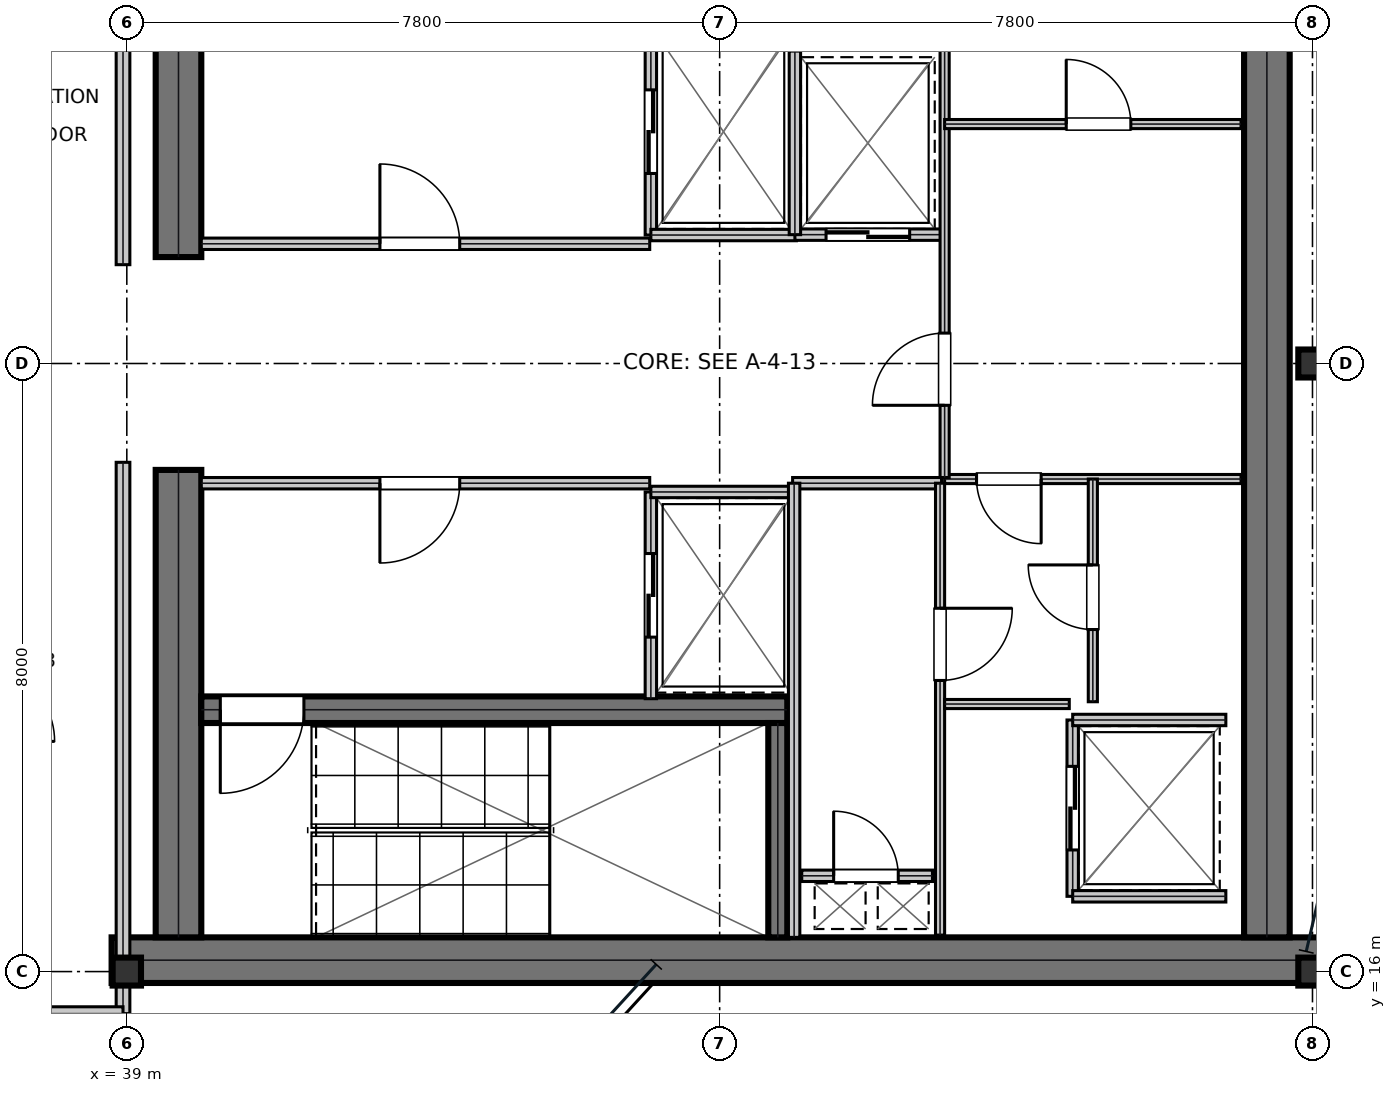
"""IFC4 building model, lengths in metres.
Left out: names, types, materials, properties, quantities, classifications, styles, units other than length and angle.
Written with IfcOpenShell. Run it as: python <this file> out.ifc"""

import sys

from ifc_helpers import new_model, si_unit, direction, frame, frame_2d, origin, origin_2d, place, context, subcontext, project, spatial, rectangle, i_section, extrude, element, fill, save


model = new_model("IFC4")
c1 = context("Model", 3, precision=1e-05, world=origin(), true_north=direction((0.0, 1.0)))
c2 = subcontext(c1, "Body", "Model", "MODEL_VIEW")
j1 = project(units=[si_unit("LENGTHUNIT", "METRE"), si_unit("PLANEANGLEUNIT", "RADIAN")], contexts=[c1])
p1 = place(None, origin())
s1 = spatial("IfcSite", under=j1, at=p1, CompositionType="ELEMENT")
p2 = place(p1, origin())
s2 = spatial("IfcBuilding", under=s1, at=p2, CompositionType="ELEMENT")
p3 = place(p2, frame((0.0, 0.0, 283.05)))
s3 = spatial("IfcBuildingStorey", under=s2, at=p3, CompositionType="ELEMENT", Elevation=283.05)
p4 = place(p3, frame((38.8, 16.15, 0.0), z_axis=(0.0, 0.0, 1.0), x_axis=(1.0, 0.0, 0.0)))
e1 = element("IfcWall", 1, at=p4, inside=s3, PredefinedType="SHEAR", context=c2, shape_type="SweptSolid", body=[
    extrude(rectangle(XDim=16.0, YDim=0.6, at=frame_2d((8.0, 0.0))), origin(), (0.0, 0.0, 1.0), 3.81),
])
for number, where, z_axis, x_axis in (
    (2, (39.68, 16.45, 0.0), (0.0, 0.0, 1.0), (0.0, 1.0, 0.0)),
    (3, (39.68, 25.4, 0.0), (0.0, 0.0, 1.0), (0.0, 1.0, 0.0)),
):
    element("IfcWall", number, at=place(p3, frame(where, z_axis=z_axis, x_axis=x_axis)), inside=s3, PredefinedType="SHEAR", context=c2, shape_type="SweptSolid", body=[
        extrude(rectangle(XDim=6.15, YDim=0.6, at=frame_2d((3.075, 0.0))), origin(), (0.0, 0.0, 1.0), 3.81),
    ])
p5 = place(p3, frame((54.0, 16.45, 0.0), z_axis=(0.0, 0.0, 1.0), x_axis=(0.0, 1.0, 0.0)))
e4 = element("IfcWall", 4, at=p5, inside=s3, PredefinedType="SHEAR", context=c2, shape_type="SweptSolid", body=[
    extrude(rectangle(XDim=15.1, YDim=0.6, at=frame_2d((7.55, 0.0))), origin(), (0.0, 0.0, 1.0), 3.81),
])
p6 = place(p3, frame((39.98, 19.445, 0.0), z_axis=(0.0, 0.0, 1.0), x_axis=(1.0, 0.0, 0.0)))
e5 = element("IfcWall", 5, at=p6, inside=s3, PredefinedType="SHEAR", context=c2, shape_type="SweptSolid", body=[
    extrude(rectangle(XDim=7.71, YDim=0.35, at=frame_2d((3.855, 0.0))), origin(), (0.0, 0.0, 1.0), 3.81),
])
p7 = place(p6, frame((0.25, 0.0, 0.0)))
e6 = element("IfcOpeningElement", 6, at=p7, cuts=e5, PredefinedType="OPENING", context=c2, shape_type="SweptSolid", body=[
    extrude(rectangle(XDim=1.1, YDim=2.15, at=frame_2d((0.55, 1.075))), frame((0.0, 0.185, 0.0), z_axis=(0.0, -1.0, 0.0), x_axis=(1.0, 0.0, 0.0)), (0.0, 0.0, 1.0), 0.37),
])
p8 = place(p3, frame((47.565, 16.45, 0.0), z_axis=(0.0, 0.0, 1.0), x_axis=(0.0, 1.0, 0.0)))
e7 = element("IfcWall", 7, at=p8, inside=s3, PredefinedType="SHEAR", context=c2, shape_type="SweptSolid", body=[
    extrude(rectangle(XDim=2.82, YDim=0.25, at=frame_2d((1.41, 0.0))), origin(), (0.0, 0.0, 1.0), 3.81),
])
for number, where, z_axis, x_axis in (
    (8, (39.0, 16.0, 0.0), (0.0, 0.0, 1.0), (1.0, 0.0, 0.0)),
    (9, (54.6, 16.0, 0.0), (0.0, 0.0, 1.0), (1.0, 0.0, 0.0)),
    (10, (54.6, 24.0, 0.0), (0.0, 0.0, 1.0), (1.0, 0.0, 0.0)),
):
    element("IfcColumn", number, at=place(p3, frame(where, z_axis=z_axis, x_axis=x_axis)), inside=s3, PredefinedType="COLUMN", context=c2, shape_type="SweptSolid", body=[
        extrude(i_section(OverallWidth=0.373, OverallDepth=0.368, WebThickness=0.015, FlangeThickness=0.024, at=origin_2d()), origin(), (0.0, 0.0, 1.0), 4.044),
    ])
p9 = place(p3, frame((39.98, 25.575, 0.0), z_axis=(0.0, 0.0, 1.0), x_axis=(1.0, 0.0, 0.0)))
e11 = element("IfcWall", 11, at=p9, inside=s3, PredefinedType="PARTITIONING", context=c2, shape_type="SweptSolid", body=[
    extrude(rectangle(XDim=5.9, YDim=0.15, at=frame_2d((2.95, 0.0))), origin(), (0.0, 0.0, 1.0), 3.81),
])
p10 = place(p9, frame((2.35, 0.0, 0.0)))
e12 = element("IfcOpeningElement", 12, at=p10, cuts=e11, PredefinedType="OPENING", context=c2, shape_type="SweptSolid", body=[
    extrude(rectangle(XDim=1.05, YDim=2.15, at=frame_2d((0.525, 1.075))), frame((0.0, 0.085, 0.0), z_axis=(0.0, -1.0, 0.0), x_axis=(1.0, 0.0, 0.0)), (0.0, 0.0, 1.0), 0.17),
])
p11 = place(p3, frame((39.98, 22.425, 0.0), z_axis=(0.0, 0.0, 1.0), x_axis=(1.0, 0.0, 0.0)))
e13 = element("IfcWall", 13, at=p11, inside=s3, PredefinedType="PARTITIONING", context=c2, shape_type="SweptSolid", body=[
    extrude(rectangle(XDim=5.9, YDim=0.15, at=frame_2d((2.95, 0.0))), origin(), (0.0, 0.0, 1.0), 3.81),
])
p12 = place(p11, frame((2.35, 0.0, 0.0)))
e14 = element("IfcOpeningElement", 14, at=p12, cuts=e13, PredefinedType="OPENING", context=c2, shape_type="SweptSolid", body=[
    extrude(rectangle(XDim=1.05, YDim=2.15, at=frame_2d((0.525, 1.075))), frame((0.0, 0.085, 0.0), z_axis=(0.0, -1.0, 0.0), x_axis=(1.0, 0.0, 0.0)), (0.0, 0.0, 1.0), 0.17),
])
p13 = place(p3, frame((45.895, 25.69, 0.0), z_axis=(0.0, 0.0, 1.0), x_axis=(0.0, 1.0, 0.0)))
e15 = element("IfcWall", 15, at=p13, inside=s3, PredefinedType="PARTITIONING", context=c2, shape_type="SweptSolid", body=[
    extrude(rectangle(XDim=2.72, YDim=0.15, at=frame_2d((1.36, 0.0))), origin(), (0.0, 0.0, 1.0), 3.81),
])
p14 = place(p13, frame((0.81, 0.0, 0.0)))
e16 = element("IfcOpeningElement", 16, at=p14, cuts=e15, PredefinedType="OPENING", context=c2, shape_type="SweptSolid", body=[
    extrude(rectangle(XDim=1.1, YDim=2.15, at=frame_2d((0.55, 1.075))), frame((0.0, 0.085, 0.0), z_axis=(0.0, -1.0, 0.0), x_axis=(1.0, 0.0, 0.0)), (0.0, 0.0, 1.0), 0.17),
])
p15 = place(p3, frame((45.895, 25.69, 0.0), z_axis=(0.0, 0.0, 1.0), x_axis=(1.0, 0.0, 0.0)))
e17 = element("IfcWall", 17, at=p15, inside=s3, PredefinedType="PARTITIONING", context=c2, shape_type="SweptSolid", body=[
    extrude(rectangle(XDim=1.915, YDim=0.15, at=frame_2d((0.958, 0.0))), origin(), (0.0, 0.0, 1.0), 3.81),
])
p16 = place(p3, frame((45.895, 19.59, 0.0), z_axis=(0.0, 0.0, 1.0), x_axis=(0.0, 1.0, 0.0)))
e18 = element("IfcWall", 18, at=p16, inside=s3, PredefinedType="PARTITIONING", context=c2, shape_type="SweptSolid", body=[
    extrude(rectangle(XDim=2.72, YDim=0.15, at=frame_2d((1.36, 0.0))), origin(), (0.0, 0.0, 1.0), 3.81),
])
p17 = place(p16, frame((0.81, 0.0, 0.0)))
e19 = element("IfcOpeningElement", 19, at=p17, cuts=e18, PredefinedType="OPENING", context=c2, shape_type="SweptSolid", body=[
    extrude(rectangle(XDim=1.1, YDim=2.15, at=frame_2d((0.55, 1.075))), frame((0.0, 0.085, 0.0), z_axis=(0.0, -1.0, 0.0), x_axis=(1.0, 0.0, 0.0)), (0.0, 0.0, 1.0), 0.17),
])
p18 = place(p3, frame((45.895, 22.31, 0.0), z_axis=(0.0, 0.0, 1.0), x_axis=(1.0, 0.0, 0.0)))
e20 = element("IfcWall", 20, at=p18, inside=s3, PredefinedType="PARTITIONING", context=c2, shape_type="SweptSolid", body=[
    extrude(rectangle(XDim=1.915, YDim=0.15, at=frame_2d((0.958, 0.0))), origin(), (0.0, 0.0, 1.0), 3.81),
])
p19 = place(p3, frame((47.79, 25.695, 0.0), z_axis=(0.0, 0.0, 1.0), x_axis=(1.0, 0.0, 0.0)))
e21 = element("IfcWall", 21, at=p19, inside=s3, PredefinedType="PARTITIONING", context=c2, shape_type="SweptSolid", body=[
    extrude(rectangle(XDim=1.92, YDim=0.15, at=frame_2d((0.96, 0.0))), origin(), (0.0, 0.0, 1.0), 3.81),
])
p20 = place(p19, frame((0.41, 0.0, 0.0)))
e22 = element("IfcOpeningElement", 22, at=p20, cuts=e21, PredefinedType="OPENING", context=c2, shape_type="SweptSolid", body=[
    extrude(rectangle(XDim=1.1, YDim=2.15, at=frame_2d((0.55, 1.075))), frame((0.0, 0.085, 0.0), z_axis=(0.0, -1.0, 0.0), x_axis=(1.0, 0.0, 0.0)), (0.0, 0.0, 1.0), 0.17),
])
p21 = place(p3, frame((47.79, 25.695, 0.0), z_axis=(0.0, 0.0, 1.0), x_axis=(0.0, 1.0, 0.0)))
e23 = element("IfcWall", 23, at=p21, inside=s3, PredefinedType="PARTITIONING", context=c2, shape_type="SweptSolid", body=[
    extrude(rectangle(XDim=2.415, YDim=0.15, at=frame_2d((1.208, 0.0))), origin(), (0.0, 0.0, 1.0), 3.81),
])
p22 = place(p3, frame((51.445, 16.99, 0.0), z_axis=(0.0, 0.0, 1.0), x_axis=(0.0, 1.0, 0.0)))
e24 = element("IfcWall", 24, at=p22, inside=s3, PredefinedType="PARTITIONING", context=c2, shape_type="SweptSolid", body=[
    extrude(rectangle(XDim=2.32, YDim=0.15, at=frame_2d((1.16, 0.0))), origin(), (0.0, 0.0, 1.0), 3.81),
])
p23 = place(p22, frame((0.61, 0.0, 0.0)))
e25 = element("IfcOpeningElement", 25, at=p23, cuts=e24, PredefinedType="OPENING", context=c2, shape_type="SweptSolid", body=[
    extrude(rectangle(XDim=1.1, YDim=2.15, at=frame_2d((0.55, 1.075))), frame((0.0, 0.085, 0.0), z_axis=(0.0, -1.0, 0.0), x_axis=(1.0, 0.0, 0.0)), (0.0, 0.0, 1.0), 0.17),
])
for number, where, z_axis, x_axis in (
    (26, (51.445, 16.99, 0.0), (0.0, 0.0, 1.0), (1.0, 0.0, 0.0)),
    (27, (51.445, 19.31, 0.0), (0.0, 0.0, 1.0), (1.0, 0.0, 0.0)),
):
    element("IfcWall", number, at=place(p3, frame(where, z_axis=z_axis, x_axis=x_axis)), inside=s3, PredefinedType="PARTITIONING", context=c2, shape_type="SweptSolid", body=[
        extrude(rectangle(XDim=2.015, YDim=0.15, at=frame_2d((1.007, 0.0))), origin(), (0.0, 0.0, 1.0), 3.81),
    ])
p24 = place(p3, frame((47.88, 17.26, 0.0), z_axis=(0.0, 0.0, 1.0), x_axis=(1.0, 0.0, 0.0)))
e28 = element("IfcWall", 28, at=p24, inside=s3, PredefinedType="PARTITIONING", context=c2, shape_type="SweptSolid", body=[
    extrude(rectangle(XDim=1.72, YDim=0.15, at=frame_2d((0.86, 0.0))), origin(), (0.0, 0.0, 1.0), 3.81),
])
p25 = place(p24, frame((0.42, 0.0, 0.0)))
e29 = element("IfcOpeningElement", 29, at=p25, cuts=e28, PredefinedType="OPENING", context=c2, shape_type="SweptSolid", body=[
    extrude(rectangle(XDim=0.85, YDim=2.15, at=frame_2d((0.425, 1.075))), frame((0.0, 0.085, 0.0), z_axis=(0.0, -1.0, 0.0), x_axis=(1.0, 0.0, 0.0)), (0.0, 0.0, 1.0), 0.17),
])
p26 = place(p3, frame((47.76, 22.425, 0.0), z_axis=(0.0, 0.0, 1.0), x_axis=(1.0, 0.0, 0.0)))
e30 = element("IfcWall", 30, at=p26, inside=s3, PredefinedType="PARTITIONING", context=c2, shape_type="SweptSolid", body=[
    extrude(rectangle(XDim=1.96, YDim=0.15, at=frame_2d((0.98, 0.0))), origin(), (0.0, 0.0, 1.0), 3.81),
])
p27 = place(p3, frame((47.78, 16.45, 0.0), z_axis=(0.0, 0.0, 1.0), x_axis=(0.0, 1.0, 0.0)))
e31 = element("IfcWall", 31, at=p27, inside=s3, PredefinedType="PARTITIONING", context=c2, shape_type="SweptSolid", body=[
    extrude(rectangle(XDim=5.975, YDim=0.15, at=frame_2d((2.988, 0.0))), origin(), (0.0, 0.0, 1.0), 3.81),
])
p28 = place(p3, frame((49.7, 16.48, 0.0), z_axis=(0.0, 0.0, 1.0), x_axis=(0.0, 1.0, 0.0)))
e32 = element("IfcWall", 32, at=p28, inside=s3, PredefinedType="PARTITIONING", context=c2, shape_type="SweptSolid", body=[
    extrude(rectangle(XDim=5.945, YDim=0.12, at=frame_2d((2.973, 0.0))), origin(), (0.0, 0.0, 1.0), 3.81),
])
p29 = place(p28, frame((3.35, 0.0, 0.0)))
e33 = element("IfcOpeningElement", 33, at=p29, cuts=e32, PredefinedType="OPENING", context=c2, shape_type="SweptSolid", body=[
    extrude(rectangle(XDim=0.95, YDim=2.15, at=frame_2d((0.475, 1.075))), frame((0.0, 0.07, 0.0), z_axis=(0.0, -1.0, 0.0), x_axis=(1.0, 0.0, 0.0)), (0.0, 0.0, 1.0), 0.14),
])
p30 = place(p3, frame((49.76, 22.48, 0.0), z_axis=(0.0, 0.0, 1.0), x_axis=(1.0, 0.0, 0.0)))
e34 = element("IfcWall", 34, at=p30, inside=s3, PredefinedType="PARTITIONING", context=c2, shape_type="SweptSolid", body=[
    extrude(rectangle(XDim=3.9, YDim=0.12, at=frame_2d((1.95, 0.0))), origin(), (0.0, 0.0, 1.0), 3.81),
])
p31 = place(p30, frame((0.42, 0.0, 0.0)))
e35 = element("IfcOpeningElement", 35, at=p31, cuts=e34, PredefinedType="OPENING", context=c2, shape_type="SweptSolid", body=[
    extrude(rectangle(XDim=0.85, YDim=2.15, at=frame_2d((0.425, 1.075))), frame((0.0, 0.07, 0.0), z_axis=(0.0, -1.0, 0.0), x_axis=(1.0, 0.0, 0.0)), (0.0, 0.0, 1.0), 0.14),
])
p32 = place(p3, frame((51.71, 19.55, 0.0), z_axis=(0.0, 0.0, 1.0), x_axis=(0.0, 1.0, 0.0)))
e36 = element("IfcWall", 36, at=p32, inside=s3, PredefinedType="PARTITIONING", context=c2, shape_type="SweptSolid", body=[
    extrude(rectangle(XDim=2.93, YDim=0.12, at=frame_2d((1.465, 0.0))), origin(), (0.0, 0.0, 1.0), 3.81),
])
p33 = place(p32, frame((0.95, 0.0, 0.0)))
e37 = element("IfcOpeningElement", 37, at=p33, cuts=e36, PredefinedType="OPENING", context=c2, shape_type="SweptSolid", body=[
    extrude(rectangle(XDim=0.85, YDim=2.15, at=frame_2d((0.425, 1.075))), frame((0.0, 0.07, 0.0), z_axis=(0.0, -1.0, 0.0), x_axis=(1.0, 0.0, 0.0)), (0.0, 0.0, 1.0), 0.14),
])
p34 = place(p3, frame((49.76, 19.52, 0.0), z_axis=(0.0, 0.0, 1.0), x_axis=(1.0, 0.0, 0.0)))
e38 = element("IfcWall", 38, at=p34, inside=s3, PredefinedType="PARTITIONING", context=c2, shape_type="SweptSolid", body=[
    extrude(rectangle(XDim=1.64, YDim=0.12, at=frame_2d((0.82, 0.0))), origin(), (0.0, 0.0, 1.0), 3.81),
])
p35 = place(p3, frame((49.76, 22.5, 0.0), z_axis=(0.0, 0.0, 1.0), x_axis=(0.0, 1.0, 0.0)))
e39 = element("IfcWall", 39, at=p35, inside=s3, PredefinedType="PARTITIONING", context=c2, shape_type="SweptSolid", body=[
    extrude(rectangle(XDim=5.72, YDim=0.12, at=frame_2d((2.86, 0.0))), origin(), (0.0, 0.0, 1.0), 3.81),
])
p36 = place(p35, frame((0.95, 0.0, 0.0)))
e40 = element("IfcOpeningElement", 40, at=p36, cuts=e39, PredefinedType="OPENING", context=c2, shape_type="SweptSolid", body=[
    extrude(rectangle(XDim=0.95, YDim=2.15, at=frame_2d((0.475, 1.075))), frame((0.0, 0.07, 0.0), z_axis=(0.0, -1.0, 0.0), x_axis=(1.0, 0.0, 0.0)), (0.0, 0.0, 1.0), 0.14),
])
p37 = place(p3, frame((49.76, 27.15, 0.0), z_axis=(0.0, 0.0, 1.0), x_axis=(1.0, 0.0, 0.0)))
e41 = element("IfcWall", 41, at=p37, inside=s3, PredefinedType="PARTITIONING", context=c2, shape_type="SweptSolid", body=[
    extrude(rectangle(XDim=3.9, YDim=0.12, at=frame_2d((1.95, 0.0))), origin(), (0.0, 0.0, 1.0), 3.81),
])
p38 = place(p37, frame((1.6, 0.0, 0.0)))
e42 = element("IfcOpeningElement", 42, at=p38, cuts=e41, PredefinedType="OPENING", context=c2, shape_type="SweptSolid", body=[
    extrude(rectangle(XDim=0.85, YDim=2.15, at=frame_2d((0.425, 1.075))), frame((0.0, 0.07, 0.0), z_axis=(0.0, -1.0, 0.0), x_axis=(1.0, 0.0, 0.0)), (0.0, 0.0, 1.0), 0.14),
])
p39 = place(p3, frame((38.95, 15.447, 0.0), z_axis=(0.0, 0.0, 1.0), x_axis=(0.0, 1.0, 0.0)))
e43 = element("IfcWall", 43, at=p39, inside=s3, PredefinedType="SOLIDWALL", context=c2, shape_type="SweptSolid", body=[
    extrude(rectangle(XDim=7.253, YDim=0.18, at=frame_2d((3.626, 0.0))), origin(), (0.0, 0.0, 1.0), 3.27),
])
p40 = place(p3, frame((37.05, 15.447, 0.0), z_axis=(0.0, 0.0, 1.0), x_axis=(1.0, 0.0, 0.0)))
e44 = element("IfcWall", 44, at=p40, inside=s3, PredefinedType="SOLIDWALL", context=c2, shape_type="SweptSolid", body=[
    extrude(rectangle(XDim=1.9, YDim=0.18, at=frame_2d((0.95, 0.0))), origin(), (0.0, 0.0, 1.0), 3.27),
])
p41 = place(p3, frame((38.95, 25.3, 0.0), z_axis=(0.0, 0.0, 1.0), x_axis=(0.0, 1.0, 0.0)))
e45 = element("IfcWall", 45, at=p41, inside=s3, PredefinedType="SOLIDWALL", context=c2, shape_type="SweptSolid", body=[
    extrude(rectangle(XDim=7.253, YDim=0.18, at=frame_2d((3.626, 0.0))), origin(), (0.0, 0.0, 1.0), 3.27),
])
p42 = place(p10, origin())
e46 = element("IfcDoor", 46, at=p42, inside=s3, OperationType="SINGLE_SWING_LEFT", PredefinedType="DOOR", context=c2, shape_type="SweptSolid", body=[
    extrude(rectangle(XDim=1.05, YDim=2.15, at=frame_2d((0.525, 1.075))), frame((0.0, 0.025, 0.0), z_axis=(0.0, -1.0, 0.0), x_axis=(1.0, 0.0, 0.0)), (0.0, 0.0, 1.0), 0.05),
])
fill(e12, e46)
p43 = place(p12, frame((1.05, 0.0, 0.0), z_axis=(0.0, 0.0, 1.0), x_axis=(-1.0, 0.0, 0.0)))
e47 = element("IfcDoor", 47, at=p43, inside=s3, OperationType="SINGLE_SWING_RIGHT", PredefinedType="DOOR", context=c2, shape_type="SweptSolid", body=[
    extrude(rectangle(XDim=1.05, YDim=2.15, at=frame_2d((0.525, 1.075))), frame((0.0, 0.025, 0.0), z_axis=(0.0, -1.0, 0.0), x_axis=(1.0, 0.0, 0.0)), (0.0, 0.0, 1.0), 0.05),
])
fill(e14, e47)
p44 = place(p14, frame((1.1, 0.0, 0.0), z_axis=(0.0, 0.0, 1.0), x_axis=(-1.0, 0.0, 0.0)))
e48 = element("IfcDoor", 48, at=p44, inside=s3, OperationType="DOUBLE_DOOR_SLIDING", PredefinedType="DOOR", context=c2, shape_type="SweptSolid", body=[
    extrude(rectangle(XDim=1.1, YDim=2.15, at=frame_2d((0.55, 1.075))), frame((0.0, 0.025, 0.0), z_axis=(0.0, -1.0, 0.0), x_axis=(1.0, 0.0, 0.0)), (0.0, 0.0, 1.0), 0.05),
])
fill(e16, e48)
p45 = place(p17, frame((1.1, 0.0, 0.0), z_axis=(0.0, 0.0, 1.0), x_axis=(-1.0, 0.0, 0.0)))
e49 = element("IfcDoor", 49, at=p45, inside=s3, OperationType="DOUBLE_DOOR_SLIDING", PredefinedType="DOOR", context=c2, shape_type="SweptSolid", body=[
    extrude(rectangle(XDim=1.1, YDim=2.15, at=frame_2d((0.55, 1.075))), frame((0.0, 0.025, 0.0), z_axis=(0.0, -1.0, 0.0), x_axis=(1.0, 0.0, 0.0)), (0.0, 0.0, 1.0), 0.05),
])
fill(e19, e49)
p46 = place(p20, frame((1.1, 0.0, 0.0), z_axis=(0.0, 0.0, 1.0), x_axis=(-1.0, 0.0, 0.0)))
e50 = element("IfcDoor", 50, at=p46, inside=s3, OperationType="DOUBLE_DOOR_SLIDING", PredefinedType="DOOR", context=c2, shape_type="SweptSolid", body=[
    extrude(rectangle(XDim=1.1, YDim=2.15, at=frame_2d((0.55, 1.075))), frame((0.0, 0.025, 0.0), z_axis=(0.0, -1.0, 0.0), x_axis=(1.0, 0.0, 0.0)), (0.0, 0.0, 1.0), 0.05),
])
fill(e22, e50)
p47 = place(p23, frame((1.1, 0.0, 0.0), z_axis=(0.0, 0.0, 1.0), x_axis=(-1.0, 0.0, 0.0)))
e51 = element("IfcDoor", 51, at=p47, inside=s3, OperationType="DOUBLE_DOOR_SLIDING", PredefinedType="DOOR", context=c2, shape_type="SweptSolid", body=[
    extrude(rectangle(XDim=1.1, YDim=2.15, at=frame_2d((0.55, 1.075))), frame((0.0, 0.025, 0.0), z_axis=(0.0, -1.0, 0.0), x_axis=(1.0, 0.0, 0.0)), (0.0, 0.0, 1.0), 0.05),
])
fill(e25, e51)
p48 = place(p25, origin())
e52 = element("IfcDoor", 52, at=p48, inside=s3, OperationType="SINGLE_SWING_LEFT", PredefinedType="TRAPDOOR", context=c2, shape_type="SweptSolid", body=[
    extrude(rectangle(XDim=0.85, YDim=2.15, at=frame_2d((0.425, 1.075))), frame((0.0, 0.025, 0.0), z_axis=(0.0, -1.0, 0.0), x_axis=(1.0, 0.0, 0.0)), (0.0, 0.0, 1.0), 0.05),
])
fill(e29, e52)
p49 = place(p29, frame((0.95, 0.0, 0.0), z_axis=(0.0, 0.0, 1.0), x_axis=(-1.0, 0.0, 0.0)))
e53 = element("IfcDoor", 53, at=p49, inside=s3, OperationType="SINGLE_SWING_LEFT", PredefinedType="DOOR", context=c2, shape_type="SweptSolid", body=[
    extrude(rectangle(XDim=0.95, YDim=2.15, at=frame_2d((0.475, 1.075))), frame((0.0, 0.025, 0.0), z_axis=(0.0, -1.0, 0.0), x_axis=(1.0, 0.0, 0.0)), (0.0, 0.0, 1.0), 0.05),
])
fill(e33, e53)
p50 = place(p31, frame((0.85, 0.0, 0.0), z_axis=(0.0, 0.0, 1.0), x_axis=(-1.0, 0.0, 0.0)))
e54 = element("IfcDoor", 54, at=p50, inside=s3, OperationType="SINGLE_SWING_LEFT", PredefinedType="DOOR", context=c2, shape_type="SweptSolid", body=[
    extrude(rectangle(XDim=0.85, YDim=2.15, at=frame_2d((0.425, 1.075))), frame((0.0, 0.025, 0.0), z_axis=(0.0, -1.0, 0.0), x_axis=(1.0, 0.0, 0.0)), (0.0, 0.0, 1.0), 0.05),
])
fill(e35, e54)
p51 = place(p33, origin())
e55 = element("IfcDoor", 55, at=p51, inside=s3, OperationType="SINGLE_SWING_RIGHT", PredefinedType="DOOR", context=c2, shape_type="SweptSolid", body=[
    extrude(rectangle(XDim=0.85, YDim=2.15, at=frame_2d((0.425, 1.075))), frame((0.0, 0.025, 0.0), z_axis=(0.0, -1.0, 0.0), x_axis=(1.0, 0.0, 0.0)), (0.0, 0.0, 1.0), 0.05),
])
fill(e37, e55)
p52 = place(p36, origin())
e56 = element("IfcDoor", 56, at=p52, inside=s3, OperationType="SINGLE_SWING_LEFT", PredefinedType="DOOR", context=c2, shape_type="SweptSolid", body=[
    extrude(rectangle(XDim=0.95, YDim=2.15, at=frame_2d((0.475, 1.075))), frame((0.0, 0.025, 0.0), z_axis=(0.0, -1.0, 0.0), x_axis=(1.0, 0.0, 0.0)), (0.0, 0.0, 1.0), 0.05),
])
fill(e40, e56)
p53 = place(p38, origin())
e57 = element("IfcDoor", 57, at=p53, inside=s3, OperationType="SINGLE_SWING_LEFT", PredefinedType="DOOR", context=c2, shape_type="SweptSolid", body=[
    extrude(rectangle(XDim=0.85, YDim=2.15, at=frame_2d((0.425, 1.075))), frame((0.0, 0.025, 0.0), z_axis=(0.0, -1.0, 0.0), x_axis=(1.0, 0.0, 0.0)), (0.0, 0.0, 1.0), 0.05),
])
fill(e42, e57)
p54 = place(p7, frame((1.1, 0.0, 0.0), z_axis=(0.0, 0.0, 1.0), x_axis=(-1.0, 0.0, 0.0)))
e58 = element("IfcDoor", 58, at=p54, inside=s3, OperationType="SINGLE_SWING_RIGHT", PredefinedType="DOOR", context=c2, shape_type="SweptSolid", body=[
    extrude(rectangle(XDim=1.1, YDim=2.15, at=frame_2d((0.55, 1.075))), frame((0.0, 0.025, 0.0), z_axis=(0.0, -1.0, 0.0), x_axis=(1.0, 0.0, 0.0)), (0.0, 0.0, 1.0), 0.05),
])
fill(e6, e58)
save(model, sys.argv[1])
